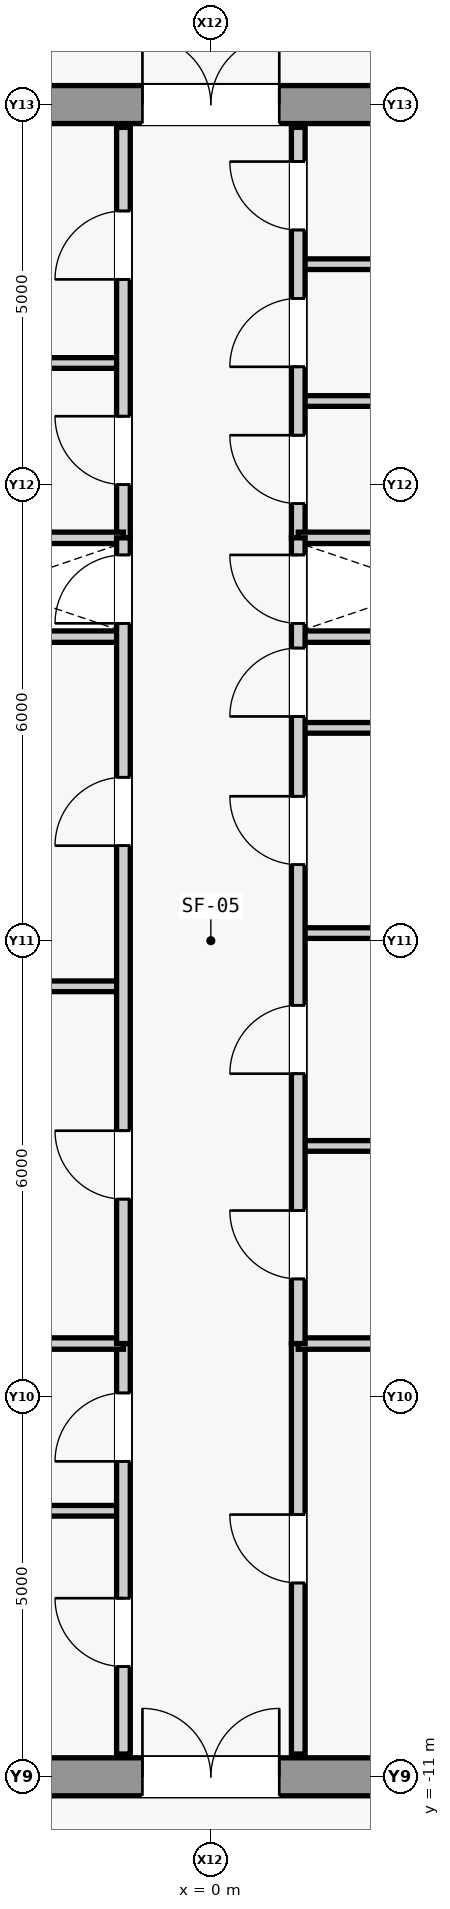
"""IFC4 building model, lengths in metres.
Left out: names, types, materials, properties, quantities, classifications, styles, units other than length and angle.
Written with IfcOpenShell. Run it as: python <this file> out.ifc"""

import sys

from ifc_helpers import new_model, si_unit, direction, frame, frame_2d, origin, place, context, subcontext, project, spatial, rectangle, extrude, source, transform, mapped, element, fill, save


model = new_model("IFC4")
c1 = context("Model", 3, precision=1e-05, world=origin(), true_north=direction((0.0, 1.0)))
c2 = subcontext(c1, "Body", "Model", "MODEL_VIEW")
j1 = project(units=[si_unit("LENGTHUNIT", "METRE"), si_unit("PLANEANGLEUNIT", "RADIAN")], contexts=[c1])
p1 = place(None, origin())
s1 = spatial("IfcSite", under=j1, at=p1, CompositionType="ELEMENT")
p2 = place(p1, origin())
s2 = spatial("IfcBuilding", under=s1, at=p2, CompositionType="ELEMENT")
p3 = place(p2, frame((0.0, 0.0, 389.9)))
s3 = spatial("IfcBuildingStorey", under=s2, at=p3, CompositionType="ELEMENT", Elevation=389.9)
m1 = source(origin(), c2, "Body", "SweptSolid", [
    extrude(rectangle(XDim=9.2, YDim=0.5, at=frame_2d((4.6, 0.0))), origin(), (0.0, 0.0, 1.0), 4.45),
])
p4 = place(p3, frame((-4.6, -11.0, 0.0), z_axis=(0.0, 0.0, 1.0), x_axis=(1.0, 0.0, 0.0)))
e1 = element("IfcWall", 1, at=p4, inside=s3, PredefinedType="SHEAR", context=c2, shape_type="MappedRepresentation", body=[
    mapped(m1, transform((0.0, 0.0, 0.0), scale=1.0)),
])
m2 = source(origin(), c2, "Body", "SweptSolid", [
    extrude(rectangle(XDim=1.8, YDim=2.25, at=frame_2d((0.9, 1.125))), frame((0.0, 0.26, 0.0), z_axis=(0.0, -1.0, 0.0), x_axis=(1.0, 0.0, 0.0)), (0.0, 0.0, 1.0), 0.52),
])
p5 = place(p4, frame((3.7, 0.0, 0.0)))
e2 = element("IfcOpeningElement", 2, at=p5, cuts=e1, PredefinedType="OPENING", context=c2, shape_type="MappedRepresentation", body=[
    mapped(m2, transform((0.0, 0.0, 0.0), scale=1.0)),
])
p6 = place(p3, frame((-4.6, 11.0, 0.0), z_axis=(0.0, 0.0, 1.0), x_axis=(1.0, 0.0, 0.0)))
e3 = element("IfcWall", 3, at=p6, inside=s3, PredefinedType="SHEAR", context=c2, shape_type="MappedRepresentation", body=[
    mapped(m1, transform((0.0, 0.0, 0.0), scale=1.0)),
])
p7 = place(p6, frame((3.7, 0.0, 0.0)))
e4 = element("IfcOpeningElement", 4, at=p7, cuts=e3, PredefinedType="OPENING", context=c2, shape_type="MappedRepresentation", body=[
    mapped(m2, transform((0.0, 0.0, 0.0), scale=1.0)),
])
m3 = source(origin(), c2, "Body", "SweptSolid", [
    extrude(rectangle(XDim=3.45, YDim=0.15, at=frame_2d((1.725, 0.0))), origin(), (0.0, 0.0, 1.0), 4.45),
])
for number, where, z_axis, x_axis in (
    (5, (-4.6, 4.0, 0.0), (0.0, 0.0, 1.0), (1.0, 0.0, 0.0)),
    (6, (1.15, 4.0, 0.0), (0.0, 0.0, 1.0), (1.0, 0.0, 0.0)),
):
    element("IfcWall", number, at=place(p3, frame(where, z_axis=z_axis, x_axis=x_axis)), inside=s3, PredefinedType="PARTITIONING", context=c2, shape_type="MappedRepresentation", body=[
        mapped(m3, transform((0.0, 0.0, 0.0), scale=1.0)),
    ])
m4 = source(origin(), c2, "Body", "SweptSolid", [
    extrude(rectangle(XDim=3.45, YDim=0.14, at=frame_2d((1.725, 0.0))), origin(), (0.0, 0.0, 1.0), 4.45),
])
p8 = place(p3, frame((-4.6, -7.5, 0.0), z_axis=(0.0, 0.0, 1.0), x_axis=(1.0, 0.0, 0.0)))
e7 = element("IfcWall", 7, at=p8, inside=s3, PredefinedType="PARTITIONING", context=c2, shape_type="MappedRepresentation", body=[
    mapped(m4, transform((0.0, 0.0, 0.0), scale=1.0)),
])
m5 = source(origin(), c2, "Body", "SweptSolid", [
    extrude(rectangle(XDim=5.4, YDim=0.18, at=frame_2d((2.7, 0.0))), origin(), (0.0, 0.0, 1.0), 4.45),
])
p9 = place(p3, frame((-1.15, -10.7, 0.0), z_axis=(0.0, 0.0, 1.0), x_axis=(0.0, 1.0, 0.0)))
e8 = element("IfcWall", 8, at=p9, inside=s3, PredefinedType="PARTITIONING", context=c2, shape_type="MappedRepresentation", body=[
    mapped(m5, transform((0.0, 0.0, 0.0), scale=1.0)),
])
m6 = source(origin(), c2, "Body", "SweptSolid", [
    extrude(rectangle(XDim=0.9, YDim=2.15, at=frame_2d((0.45, 1.075))), frame((0.0, 0.1, 0.0), z_axis=(0.0, -1.0, 0.0), x_axis=(1.0, 0.0, 0.0)), (0.0, 0.0, 1.0), 0.2),
])
p10 = place(p9, frame((1.15, 0.0, 0.0)))
e9 = element("IfcOpeningElement", 9, at=p10, cuts=e8, PredefinedType="OPENING", context=c2, shape_type="MappedRepresentation", body=[
    mapped(m6, transform((0.0, 0.0, 0.0), scale=1.0)),
])
p11 = place(p9, frame((3.85, 0.0, 0.0)))
e10 = element("IfcOpeningElement", 10, at=p11, cuts=e8, PredefinedType="OPENING", context=c2, shape_type="MappedRepresentation", body=[
    mapped(m6, transform((0.0, 0.0, 0.0), scale=1.0)),
])
p12 = place(p3, frame((1.15, -10.7, 0.0), z_axis=(0.0, 0.0, 1.0), x_axis=(0.0, 1.0, 0.0)))
e11 = element("IfcWall", 11, at=p12, inside=s3, PredefinedType="PARTITIONING", context=c2, shape_type="MappedRepresentation", body=[
    mapped(m5, transform((0.0, 0.0, 0.0), scale=1.0)),
])
p13 = place(p12, frame((2.25, 0.0, 0.0)))
e12 = element("IfcOpeningElement", 12, at=p13, cuts=e11, PredefinedType="OPENING", context=c2, shape_type="MappedRepresentation", body=[
    mapped(m6, transform((0.0, 0.0, 0.0), scale=1.0)),
])
for number, where, z_axis, x_axis in (
    (13, (-4.6, -5.3, 0.0), (0.0, 0.0, 1.0), (1.0, 0.0, 0.0)),
    (14, (1.15, -5.3, 0.0), (0.0, 0.0, 1.0), (1.0, 0.0, 0.0)),
):
    element("IfcWall", number, at=place(p3, frame(where, z_axis=z_axis, x_axis=x_axis)), inside=s3, PredefinedType="PARTITIONING", context=c2, shape_type="MappedRepresentation", body=[
        mapped(m3, transform((0.0, 0.0, 0.0), scale=1.0)),
    ])
p14 = place(p3, frame((-4.6, 7.6, 0.0), z_axis=(0.0, 0.0, 1.0), x_axis=(1.0, 0.0, 0.0)))
e15 = element("IfcWall", 15, at=p14, inside=s3, PredefinedType="PARTITIONING", context=c2, shape_type="MappedRepresentation", body=[
    mapped(m4, transform((0.0, 0.0, 0.0), scale=1.0)),
])
p15 = place(p3, frame((-1.15, 5.3, 0.0), z_axis=(0.0, 0.0, 1.0), x_axis=(0.0, 1.0, 0.0)))
e16 = element("IfcWall", 16, at=p15, inside=s3, PredefinedType="PARTITIONING", context=c2, shape_type="MappedRepresentation", body=[
    mapped(m5, transform((0.0, 0.0, 0.0), scale=1.0)),
])
p16 = place(p15, frame((0.7, 0.0, 0.0)))
e17 = element("IfcOpeningElement", 17, at=p16, cuts=e16, PredefinedType="OPENING", context=c2, shape_type="MappedRepresentation", body=[
    mapped(m6, transform((0.0, 0.0, 0.0), scale=1.0)),
])
p17 = place(p15, frame((3.4, 0.0, 0.0)))
e18 = element("IfcOpeningElement", 18, at=p17, cuts=e16, PredefinedType="OPENING", context=c2, shape_type="MappedRepresentation", body=[
    mapped(m6, transform((0.0, 0.0, 0.0), scale=1.0)),
])
for number, where, z_axis, x_axis in (
    (19, (1.15, 7.1, 0.0), (0.0, 0.0, 1.0), (1.0, 0.0, 0.0)),
    (20, (1.15, 8.9, 0.0), (0.0, 0.0, 1.0), (1.0, 0.0, 0.0)),
):
    element("IfcWall", number, at=place(p3, frame(where, z_axis=z_axis, x_axis=x_axis)), inside=s3, PredefinedType="PARTITIONING", context=c2, shape_type="MappedRepresentation", body=[
        mapped(m4, transform((0.0, 0.0, 0.0), scale=1.0)),
    ])
p18 = place(p3, frame((1.15, 5.3, 0.0), z_axis=(0.0, 0.0, 1.0), x_axis=(0.0, 1.0, 0.0)))
e21 = element("IfcWall", 21, at=p18, inside=s3, PredefinedType="PARTITIONING", context=c2, shape_type="MappedRepresentation", body=[
    mapped(m5, transform((0.0, 0.0, 0.0), scale=1.0)),
])
p19 = place(p18, frame((0.45, 0.0, 0.0)))
e22 = element("IfcOpeningElement", 22, at=p19, cuts=e21, PredefinedType="OPENING", context=c2, shape_type="MappedRepresentation", body=[
    mapped(m6, transform((0.0, 0.0, 0.0), scale=1.0)),
])
p20 = place(p18, frame((2.25, 0.0, 0.0)))
e23 = element("IfcOpeningElement", 23, at=p20, cuts=e21, PredefinedType="OPENING", context=c2, shape_type="MappedRepresentation", body=[
    mapped(m6, transform((0.0, 0.0, 0.0), scale=1.0)),
])
p21 = place(p18, frame((4.05, 0.0, 0.0)))
e24 = element("IfcOpeningElement", 24, at=p21, cuts=e21, PredefinedType="OPENING", context=c2, shape_type="MappedRepresentation", body=[
    mapped(m6, transform((0.0, 0.0, 0.0), scale=1.0)),
])
for number, where, z_axis, x_axis in (
    (25, (-4.6, 5.3, 0.0), (0.0, 0.0, 1.0), (1.0, 0.0, 0.0)),
    (26, (1.15, 5.3, 0.0), (0.0, 0.0, 1.0), (1.0, 0.0, 0.0)),
):
    element("IfcWall", number, at=place(p3, frame(where, z_axis=z_axis, x_axis=x_axis)), inside=s3, PredefinedType="PARTITIONING", context=c2, shape_type="MappedRepresentation", body=[
        mapped(m3, transform((0.0, 0.0, 0.0), scale=1.0)),
    ])
p22 = place(p3, frame((-4.6, -0.6, 0.0), z_axis=(0.0, 0.0, 1.0), x_axis=(1.0, 0.0, 0.0)))
e27 = element("IfcWall", 27, at=p22, inside=s3, PredefinedType="PARTITIONING", context=c2, shape_type="MappedRepresentation", body=[
    mapped(m4, transform((0.0, 0.0, 0.0), scale=1.0)),
])
m7 = source(origin(), c2, "Body", "SweptSolid", [
    extrude(rectangle(XDim=10.6, YDim=0.18, at=frame_2d((5.3, 0.0))), origin(), (0.0, 0.0, 1.0), 4.45),
])
p23 = place(p3, frame((-1.15, -5.3, 0.0), z_axis=(0.0, 0.0, 1.0), x_axis=(0.0, 1.0, 0.0)))
e28 = element("IfcWall", 28, at=p23, inside=s3, PredefinedType="PARTITIONING", context=c2, shape_type="MappedRepresentation", body=[
    mapped(m7, transform((0.0, 0.0, 0.0), scale=1.0)),
])
p24 = place(p23, frame((1.9, 0.0, 0.0)))
e29 = element("IfcOpeningElement", 29, at=p24, cuts=e28, PredefinedType="OPENING", context=c2, shape_type="MappedRepresentation", body=[
    mapped(m6, transform((0.0, 0.0, 0.0), scale=1.0)),
])
p25 = place(p23, frame((6.55, 0.0, 0.0)))
e30 = element("IfcOpeningElement", 30, at=p25, cuts=e28, PredefinedType="OPENING", context=c2, shape_type="MappedRepresentation", body=[
    mapped(m6, transform((0.0, 0.0, 0.0), scale=1.0)),
])
p26 = place(p23, frame((9.475, 0.0, 0.0)))
e31 = element("IfcOpeningElement", 31, at=p26, cuts=e28, PredefinedType="OPENING", context=c2, shape_type="MappedRepresentation", body=[
    mapped(m6, transform((0.0, 0.0, 0.0), scale=1.0)),
])
p27 = place(p3, frame((1.15, -2.7, 0.0), z_axis=(0.0, 0.0, 1.0), x_axis=(1.0, 0.0, 0.0)))
e32 = element("IfcWall", 32, at=p27, inside=s3, PredefinedType="PARTITIONING", context=c2, shape_type="MappedRepresentation", body=[
    mapped(m4, transform((0.0, 0.0, 0.0), scale=1.0)),
])
m8 = source(origin(), c2, "Body", "SweptSolid", [
    extrude(rectangle(XDim=3.45, YDim=0.14, at=frame_2d((1.725, 0.0))), origin(), (0.0, 0.0, 1.0), 3.755),
])
p28 = place(p3, frame((1.15, 0.1, 0.0), z_axis=(0.0, 0.0, 1.0), x_axis=(1.0, 0.0, 0.0)))
e33 = element("IfcWall", 33, at=p28, inside=s3, PredefinedType="PARTITIONING", context=c2, shape_type="MappedRepresentation", body=[
    mapped(m8, transform((0.0, 0.0, 0.0), scale=1.0)),
])
p29 = place(p3, frame((1.15, 2.8, 0.0), z_axis=(0.0, 0.0, 1.0), x_axis=(1.0, 0.0, 0.0)))
e34 = element("IfcWall", 34, at=p29, inside=s3, PredefinedType="PARTITIONING", context=c2, shape_type="MappedRepresentation", body=[
    mapped(m4, transform((0.0, 0.0, 0.0), scale=1.0)),
])
p30 = place(p3, frame((1.15, -5.3, 0.0), z_axis=(0.0, 0.0, 1.0), x_axis=(0.0, 1.0, 0.0)))
e35 = element("IfcWall", 35, at=p30, inside=s3, PredefinedType="PARTITIONING", context=c2, shape_type="MappedRepresentation", body=[
    mapped(m7, transform((0.0, 0.0, 0.0), scale=1.0)),
])
p31 = place(p30, frame((0.85, 0.0, 0.0)))
e36 = element("IfcOpeningElement", 36, at=p31, cuts=e35, PredefinedType="OPENING", context=c2, shape_type="MappedRepresentation", body=[
    mapped(m6, transform((0.0, 0.0, 0.0), scale=1.0)),
])
p32 = place(p30, frame((3.55, 0.0, 0.0)))
e37 = element("IfcOpeningElement", 37, at=p32, cuts=e35, PredefinedType="OPENING", context=c2, shape_type="MappedRepresentation", body=[
    mapped(m6, transform((0.0, 0.0, 0.0), scale=1.0)),
])
p33 = place(p30, frame((6.3, 0.0, 0.0)))
e38 = element("IfcOpeningElement", 38, at=p33, cuts=e35, PredefinedType="OPENING", context=c2, shape_type="MappedRepresentation", body=[
    mapped(m6, transform((0.0, 0.0, 0.0), scale=1.0)),
])
p34 = place(p30, frame((8.25, 0.0, 0.0)))
e39 = element("IfcOpeningElement", 39, at=p34, cuts=e35, PredefinedType="OPENING", context=c2, shape_type="MappedRepresentation", body=[
    mapped(m6, transform((0.0, 0.0, 0.0), scale=1.0)),
])
p35 = place(p30, frame((9.475, 0.0, 0.0)))
e40 = element("IfcOpeningElement", 40, at=p35, cuts=e35, PredefinedType="OPENING", context=c2, shape_type="MappedRepresentation", body=[
    mapped(m6, transform((0.0, 0.0, 0.0), scale=1.0)),
])
m9 = source(origin(), c2, "Body", "SweptSolid", [
    extrude(rectangle(XDim=0.9, YDim=2.15, at=frame_2d((0.45, 1.075))), frame((0.0, 0.025, 0.0), z_axis=(0.0, -1.0, 0.0), x_axis=(1.0, 0.0, 0.0)), (0.0, 0.0, 1.0), 0.05),
])
p36 = place(p10, origin())
e41 = element("IfcDoor", 41, at=p36, inside=s3, OperationType="SINGLE_SWING_RIGHT", PredefinedType="DOOR", context=c2, shape_type="MappedRepresentation", body=[
    mapped(m9, transform((0.0, 0.0, 0.0), scale=1.0)),
])
fill(e9, e41)
p37 = place(p11, origin())
e42 = element("IfcDoor", 42, at=p37, inside=s3, OperationType="SINGLE_SWING_LEFT", PredefinedType="DOOR", context=c2, shape_type="MappedRepresentation", body=[
    mapped(m9, transform((0.0, 0.0, 0.0), scale=1.0)),
])
fill(e10, e42)
p38 = place(p13, origin())
e43 = element("IfcDoor", 43, at=p38, inside=s3, OperationType="SINGLE_SWING_RIGHT", PredefinedType="DOOR", context=c2, shape_type="MappedRepresentation", body=[
    mapped(m9, transform((0.0, 0.0, 0.0), scale=1.0)),
])
fill(e12, e43)
m10 = source(origin(), c2, "Body", "SweptSolid", [
    extrude(rectangle(XDim=1.8, YDim=2.25, at=frame_2d((0.9, 1.125))), frame((0.0, 0.025, 0.0), z_axis=(0.0, -1.0, 0.0), x_axis=(1.0, 0.0, 0.0)), (0.0, 0.0, 1.0), 0.05),
])
p39 = place(p5, origin())
e44 = element("IfcDoor", 44, at=p39, inside=s3, OperationType="SINGLE_SWING_LEFT", PredefinedType="DOOR", context=c2, shape_type="MappedRepresentation", body=[
    mapped(m10, transform((0.0, 0.0, 0.0), scale=1.0)),
])
fill(e2, e44)
p40 = place(p16, origin())
e45 = element("IfcDoor", 45, at=p40, inside=s3, OperationType="SINGLE_SWING_RIGHT", PredefinedType="DOOR", context=c2, shape_type="MappedRepresentation", body=[
    mapped(m9, transform((0.0, 0.0, 0.0), scale=1.0)),
])
fill(e17, e45)
p41 = place(p17, origin())
e46 = element("IfcDoor", 46, at=p41, inside=s3, OperationType="SINGLE_SWING_LEFT", PredefinedType="DOOR", context=c2, shape_type="MappedRepresentation", body=[
    mapped(m9, transform((0.0, 0.0, 0.0), scale=1.0)),
])
fill(e18, e46)
p42 = place(p19, origin())
e47 = element("IfcDoor", 47, at=p42, inside=s3, OperationType="SINGLE_SWING_RIGHT", PredefinedType="DOOR", context=c2, shape_type="MappedRepresentation", body=[
    mapped(m9, transform((0.0, 0.0, 0.0), scale=1.0)),
])
fill(e22, e47)
p43 = place(p20, origin())
e48 = element("IfcDoor", 48, at=p43, inside=s3, OperationType="SINGLE_SWING_LEFT", PredefinedType="DOOR", context=c2, shape_type="MappedRepresentation", body=[
    mapped(m9, transform((0.0, 0.0, 0.0), scale=1.0)),
])
fill(e23, e48)
p44 = place(p21, origin())
e49 = element("IfcDoor", 49, at=p44, inside=s3, OperationType="SINGLE_SWING_RIGHT", PredefinedType="DOOR", context=c2, shape_type="MappedRepresentation", body=[
    mapped(m9, transform((0.0, 0.0, 0.0), scale=1.0)),
])
fill(e24, e49)
p45 = place(p7, origin())
e50 = element("IfcDoor", 50, at=p45, inside=s3, OperationType="SINGLE_SWING_RIGHT", PredefinedType="DOOR", context=c2, shape_type="MappedRepresentation", body=[
    mapped(m10, transform((0.0, 0.0, 0.0), scale=1.0)),
])
fill(e4, e50)
p46 = place(p24, origin())
e51 = element("IfcDoor", 51, at=p46, inside=s3, OperationType="SINGLE_SWING_RIGHT", PredefinedType="DOOR", context=c2, shape_type="MappedRepresentation", body=[
    mapped(m9, transform((0.0, 0.0, 0.0), scale=1.0)),
])
fill(e29, e51)
p47 = place(p25, origin())
e52 = element("IfcDoor", 52, at=p47, inside=s3, OperationType="SINGLE_SWING_LEFT", PredefinedType="DOOR", context=c2, shape_type="MappedRepresentation", body=[
    mapped(m9, transform((0.0, 0.0, 0.0), scale=1.0)),
])
fill(e30, e52)
p48 = place(p31, origin())
e53 = element("IfcDoor", 53, at=p48, inside=s3, OperationType="SINGLE_SWING_RIGHT", PredefinedType="DOOR", context=c2, shape_type="MappedRepresentation", body=[
    mapped(m9, transform((0.0, 0.0, 0.0), scale=1.0)),
])
fill(e36, e53)
p49 = place(p32, origin())
e54 = element("IfcDoor", 54, at=p49, inside=s3, OperationType="SINGLE_SWING_LEFT", PredefinedType="DOOR", context=c2, shape_type="MappedRepresentation", body=[
    mapped(m9, transform((0.0, 0.0, 0.0), scale=1.0)),
])
fill(e37, e54)
p50 = place(p33, origin())
e55 = element("IfcDoor", 55, at=p50, inside=s3, OperationType="SINGLE_SWING_RIGHT", PredefinedType="DOOR", context=c2, shape_type="MappedRepresentation", body=[
    mapped(m9, transform((0.0, 0.0, 0.0), scale=1.0)),
])
fill(e38, e55)
p51 = place(p34, origin())
e56 = element("IfcDoor", 56, at=p51, inside=s3, OperationType="SINGLE_SWING_LEFT", PredefinedType="DOOR", context=c2, shape_type="MappedRepresentation", body=[
    mapped(m9, transform((0.0, 0.0, 0.0), scale=1.0)),
])
fill(e39, e56)
p52 = place(p26, origin())
e57 = element("IfcDoor", 57, at=p52, inside=s3, OperationType="SINGLE_SWING_LEFT", PredefinedType="DOOR", context=c2, shape_type="MappedRepresentation", body=[
    mapped(m9, transform((0.0, 0.0, 0.0), scale=1.0)),
])
fill(e31, e57)
p53 = place(p35, origin())
e58 = element("IfcDoor", 58, at=p53, inside=s3, OperationType="SINGLE_SWING_RIGHT", PredefinedType="DOOR", context=c2, shape_type="MappedRepresentation", body=[
    mapped(m9, transform((0.0, 0.0, 0.0), scale=1.0)),
])
fill(e40, e58)
save(model, sys.argv[1])
